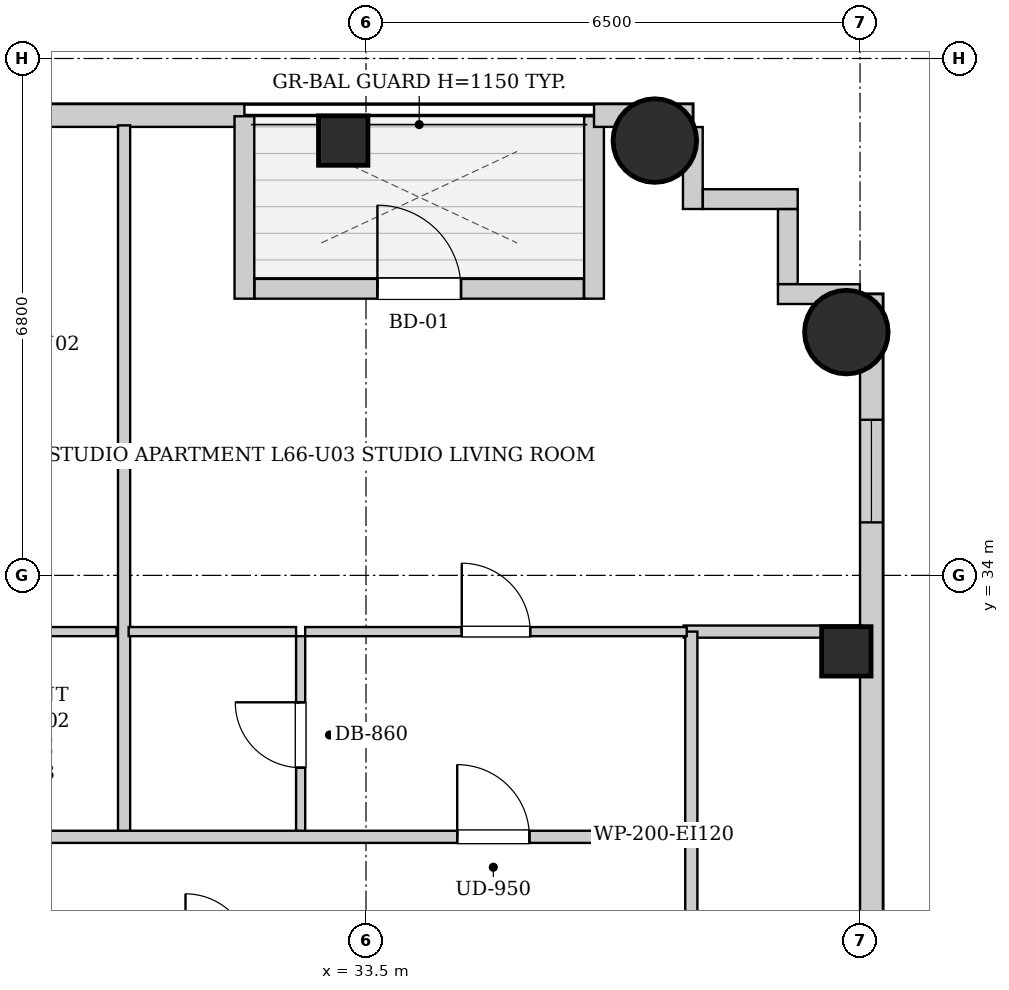
"""IFC4 building model, lengths in metres.
Left out: names, types, materials, properties, quantities, classifications, styles, units other than length and angle.
Written with IfcOpenShell. Run it as: python <this file> out.ifc"""

import sys

from ifc_helpers import new_model, si_unit, direction, frame, frame_2d, origin, origin_2d, place, context, subcontext, project, spatial, rectangle, circle, extrude, element, fill, save


model = new_model("IFC4")
c1 = context("Model", 3, precision=1e-05, world=origin(), true_north=direction((0.0, 1.0)))
c2 = subcontext(c1, "Body", "Model", "MODEL_VIEW")
j1 = project(units=[si_unit("LENGTHUNIT", "METRE"), si_unit("PLANEANGLEUNIT", "RADIAN")], contexts=[c1])
p1 = place(None, origin())
s1 = spatial("IfcSite", under=j1, at=p1, CompositionType="ELEMENT")
p2 = place(p1, origin())
s2 = spatial("IfcBuilding", under=s1, at=p2, CompositionType="ELEMENT")
p3 = place(p2, frame((0.0, 0.0, 227.5)))
s3 = spatial("IfcBuildingStorey", under=s2, at=p3, CompositionType="ELEMENT", Elevation=227.5)
p4 = place(p3, frame((33.2, 39.72, 0.0), z_axis=(0.0, 0.0, 1.0), x_axis=(1.0, 0.0, 0.0)))
e1 = element("IfcColumn", 1, at=p4, inside=s3, PredefinedType="COLUMN", context=c2, shape_type="SweptSolid", body=[
    extrude(rectangle(XDim=0.65, YDim=0.65, at=origin_2d()), origin(), (0.0, 0.0, 1.0), 3.4),
])
p5 = place(p3, frame((37.3, 39.72, 0.0), z_axis=(0.0, 0.0, 1.0), x_axis=(1.0, 0.0, 0.0)))
e2 = element("IfcColumn", 2, at=p5, inside=s3, PredefinedType="COLUMN", context=c2, shape_type="SweptSolid", body=[
    extrude(circle(Radius=0.55, at=origin_2d()), origin(), (0.0, 0.0, 1.0), 3.4),
])
p6 = place(p3, frame((39.82, 33.0, 0.0), z_axis=(0.0, 0.0, 1.0), x_axis=(1.0, 0.0, 0.0)))
e3 = element("IfcColumn", 3, at=p6, inside=s3, PredefinedType="COLUMN", context=c2, shape_type="SweptSolid", body=[
    extrude(rectangle(XDim=0.65, YDim=0.65, at=origin_2d()), origin(), (0.0, 0.0, 1.0), 3.4),
])
p7 = place(p3, frame((39.82, 37.2, 0.0), z_axis=(0.0, 0.0, 1.0), x_axis=(1.0, 0.0, 0.0)))
e4 = element("IfcColumn", 4, at=p7, inside=s3, PredefinedType="COLUMN", context=c2, shape_type="SweptSolid", body=[
    extrude(circle(Radius=0.55, at=origin_2d()), origin(), (0.0, 0.0, 1.0), 3.4),
])
p8 = place(p3, frame((13.1, 40.05, 0.0), z_axis=(0.0, 0.0, 1.0), x_axis=(1.0, 0.0, 0.0)))
e5 = element("IfcWall", 5, at=p8, inside=s3, PredefinedType="SOLIDWALL", context=c2, shape_type="SweptSolid", body=[
    extrude(rectangle(XDim=18.8, YDim=0.3, at=frame_2d((9.4, 0.0))), origin(), (0.0, 0.0, 1.0), 3.14),
])
p9 = place(p8, frame((1.806, 0.0, 0.55)))
e6 = element("IfcOpeningElement", 6, at=p9, cuts=e5, PredefinedType="OPENING", context=c2, shape_type="SweptSolid", body=[
    extrude(rectangle(XDim=1.35, YDim=1.2, at=frame_2d((0.675, 0.6))), frame((0.0, 0.16, 0.0), z_axis=(0.0, -1.0, 0.0), x_axis=(1.0, 0.0, 0.0)), (0.0, 0.0, 1.0), 0.32),
])
p10 = place(p8, frame((5.641, 0.0, 0.55)))
e7 = element("IfcOpeningElement", 7, at=p10, cuts=e5, PredefinedType="OPENING", context=c2, shape_type="SweptSolid", body=[
    extrude(rectangle(XDim=1.35, YDim=1.2, at=frame_2d((0.675, 0.6))), frame((0.0, 0.16, 0.0), z_axis=(0.0, -1.0, 0.0), x_axis=(1.0, 0.0, 0.0)), (0.0, 0.0, 1.0), 0.32),
])
p11 = place(p8, frame((8.55, 0.0, 0.55)))
e8 = element("IfcOpeningElement", 8, at=p11, cuts=e5, PredefinedType="OPENING", context=c2, shape_type="SweptSolid", body=[
    extrude(rectangle(XDim=0.85, YDim=1.2, at=frame_2d((0.425, 0.6))), frame((0.0, 0.16, 0.0), z_axis=(0.0, -1.0, 0.0), x_axis=(1.0, 0.0, 0.0)), (0.0, 0.0, 1.0), 0.32),
])
p12 = place(p8, frame((14.4, 0.0, 0.55)))
e9 = element("IfcOpeningElement", 9, at=p12, cuts=e5, PredefinedType="OPENING", context=c2, shape_type="SweptSolid", body=[
    extrude(rectangle(XDim=1.35, YDim=1.2, at=frame_2d((0.675, 0.6))), frame((0.0, 0.16, 0.0), z_axis=(0.0, -1.0, 0.0), x_axis=(1.0, 0.0, 0.0)), (0.0, 0.0, 1.0), 0.32),
])
p13 = place(p3, frame((31.9, 40.04, 0.0), z_axis=(0.0, 0.0, 1.0), x_axis=(0.0, -1.0, 0.0)))
e10 = element("IfcWall", 10, at=p13, inside=s3, PredefinedType="SOLIDWALL", context=c2, shape_type="SweptSolid", body=[
    extrude(rectangle(XDim=2.4, YDim=0.26, at=frame_2d((1.2, 0.0))), origin(), (0.0, 0.0, 1.0), 3.14),
])
p14 = place(p3, frame((32.034, 37.77, 0.0), z_axis=(0.0, 0.0, 1.0), x_axis=(1.0, 0.0, 0.0)))
e11 = element("IfcWall", 11, at=p14, inside=s3, PredefinedType="SOLIDWALL", context=c2, shape_type="SweptSolid", body=[
    extrude(rectangle(XDim=4.332, YDim=0.26, at=frame_2d((2.166, 0.0))), origin(), (0.0, 0.0, 1.0), 3.14),
])
p15 = place(p14, frame((1.616, 0.0, 0.0)))
e12 = element("IfcOpeningElement", 12, at=p15, cuts=e11, PredefinedType="OPENING", context=c2, shape_type="SweptSolid", body=[
    extrude(rectangle(XDim=1.1, YDim=2.0, at=frame_2d((0.55, 1.0))), frame((0.0, 0.14, 0.0), z_axis=(0.0, -1.0, 0.0), x_axis=(1.0, 0.0, 0.0)), (0.0, 0.0, 1.0), 0.28),
])
p16 = place(p3, frame((36.5, 37.64, 0.0), z_axis=(0.0, 0.0, 1.0), x_axis=(0.0, 1.0, 0.0)))
e13 = element("IfcWall", 13, at=p16, inside=s3, PredefinedType="SOLIDWALL", context=c2, shape_type="SweptSolid", body=[
    extrude(rectangle(XDim=2.4, YDim=0.26, at=frame_2d((1.2, 0.0))), origin(), (0.0, 0.0, 1.0), 3.14),
])
p17 = place(p3, frame((36.5, 40.05, 0.0), z_axis=(0.0, 0.0, 1.0), x_axis=(1.0, 0.0, 0.0)))
e14 = element("IfcWall", 14, at=p17, inside=s3, PredefinedType="SOLIDWALL", context=c2, shape_type="SweptSolid", body=[
    extrude(rectangle(XDim=1.3, YDim=0.3, at=frame_2d((0.65, 0.0))), origin(), (0.0, 0.0, 1.0), 3.14),
])
p18 = place(p3, frame((40.15, 37.7, 0.0), z_axis=(0.0, 0.0, 1.0), x_axis=(0.0, -1.0, 0.0)))
e15 = element("IfcWall", 15, at=p18, inside=s3, PredefinedType="SOLIDWALL", context=c2, shape_type="SweptSolid", body=[
    extrude(rectangle(XDim=31.4, YDim=0.3, at=frame_2d((15.7, 0.0))), origin(), (0.0, 0.0, 1.0), 3.14),
])
p19 = place(p18, frame((28.396, 0.0, 0.55)))
e16 = element("IfcOpeningElement", 16, at=p19, cuts=e15, PredefinedType="OPENING", context=c2, shape_type="SweptSolid", body=[
    extrude(rectangle(XDim=1.35, YDim=1.2, at=frame_2d((0.675, 0.6))), frame((0.0, 0.16, 0.0), z_axis=(0.0, -1.0, 0.0), x_axis=(1.0, 0.0, 0.0)), (0.0, 0.0, 1.0), 0.32),
])
p20 = place(p18, frame((1.653, 0.0, 0.55)))
e17 = element("IfcOpeningElement", 17, at=p20, cuts=e15, PredefinedType="OPENING", context=c2, shape_type="SweptSolid", body=[
    extrude(rectangle(XDim=1.35, YDim=1.2, at=frame_2d((0.675, 0.6))), frame((0.0, 0.16, 0.0), z_axis=(0.0, -1.0, 0.0), x_axis=(1.0, 0.0, 0.0)), (0.0, 0.0, 1.0), 0.32),
])
p21 = place(p18, frame((19.683, 0.0, 0.55)))
e18 = element("IfcOpeningElement", 18, at=p21, cuts=e15, PredefinedType="OPENING", context=c2, shape_type="SweptSolid", body=[
    extrude(rectangle(XDim=1.35, YDim=1.2, at=frame_2d((0.675, 0.6))), frame((0.0, 0.16, 0.0), z_axis=(0.0, -1.0, 0.0), x_axis=(1.0, 0.0, 0.0)), (0.0, 0.0, 1.0), 0.32),
])
p22 = place(p18, frame((10.367, 0.0, 0.55)))
e19 = element("IfcOpeningElement", 19, at=p22, cuts=e15, PredefinedType="OPENING", context=c2, shape_type="SweptSolid", body=[
    extrude(rectangle(XDim=1.35, YDim=1.2, at=frame_2d((0.675, 0.6))), frame((0.0, 0.16, 0.0), z_axis=(0.0, -1.0, 0.0), x_axis=(1.0, 0.0, 0.0)), (0.0, 0.0, 1.0), 0.32),
])
p23 = place(p3, frame((37.8, 39.898, 0.0), z_axis=(0.0, 0.0, 1.0), x_axis=(0.0, -1.0, 0.0)))
e20 = element("IfcWall", 20, at=p23, inside=s3, PredefinedType="SOLIDWALL", context=c2, shape_type="SweptSolid", body=[
    extrude(rectangle(XDim=1.078, YDim=0.26, at=frame_2d((0.539, 0.0))), origin(), (0.0, 0.0, 1.0), 3.14),
])
p24 = place(p3, frame((37.932, 38.95, 0.0), z_axis=(0.0, 0.0, 1.0), x_axis=(1.0, 0.0, 0.0)))
e21 = element("IfcWall", 21, at=p24, inside=s3, PredefinedType="SOLIDWALL", context=c2, shape_type="SweptSolid", body=[
    extrude(rectangle(XDim=1.248, YDim=0.26, at=frame_2d((0.624, 0.0))), origin(), (0.0, 0.0, 1.0), 3.14),
])
p25 = place(p3, frame((39.05, 38.818, 0.0), z_axis=(0.0, 0.0, 1.0), x_axis=(0.0, -1.0, 0.0)))
e22 = element("IfcWall", 22, at=p25, inside=s3, PredefinedType="SOLIDWALL", context=c2, shape_type="SweptSolid", body=[
    extrude(rectangle(XDim=0.986, YDim=0.26, at=frame_2d((0.493, 0.0))), origin(), (0.0, 0.0, 1.0), 3.14),
])
p26 = place(p3, frame((38.92, 37.7, 0.0), z_axis=(0.0, 0.0, 1.0), x_axis=(1.0, 0.0, 0.0)))
e23 = element("IfcWall", 23, at=p26, inside=s3, PredefinedType="SOLIDWALL", context=c2, shape_type="SweptSolid", body=[
    extrude(rectangle(XDim=1.078, YDim=0.26, at=frame_2d((0.539, 0.0))), origin(), (0.0, 0.0, 1.0), 3.14),
])
p27 = place(p3, frame((37.78, 28.98, 0.0), z_axis=(0.0, 0.0, 1.0), x_axis=(0.0, 1.0, 0.0)))
e24 = element("IfcWall", 24, at=p27, inside=s3, PredefinedType="PARTITIONING", context=c2, shape_type="SweptSolid", body=[
    extrude(rectangle(XDim=1.58, YDim=0.16, at=frame_2d((0.79, 0.0))), origin(), (0.0, 0.0, 1.0), 3.14),
])
p28 = place(p3, frame((27.25, 33.26, 0.0), z_axis=(0.0, 0.0, 1.0), x_axis=(1.0, 0.0, 0.0)))
e25 = element("IfcWall", 25, at=p28, inside=s3, PredefinedType="PARTITIONING", context=c2, shape_type="SweptSolid", body=[
    extrude(rectangle(XDim=2.967, YDim=0.12, at=frame_2d((1.483, 0.0))), origin(), (0.0, 0.0, 1.0), 3.14),
])
p29 = place(p28, frame((1.033, 0.0, 0.0)))
e26 = element("IfcOpeningElement", 26, at=p29, cuts=e25, PredefinedType="OPENING", context=c2, shape_type="SweptSolid", body=[
    extrude(rectangle(XDim=0.9, YDim=2.05, at=frame_2d((0.45, 1.025))), frame((0.0, 0.07, 0.0), z_axis=(0.0, -1.0, 0.0), x_axis=(1.0, 0.0, 0.0)), (0.0, 0.0, 1.0), 0.14),
])
p30 = place(p3, frame((37.68, 33.26, 0.0), z_axis=(0.0, 0.0, 1.0), x_axis=(1.0, 0.0, 0.0)))
e27 = element("IfcWall", 27, at=p30, inside=s3, PredefinedType="PARTITIONING", context=c2, shape_type="SweptSolid", body=[
    extrude(rectangle(XDim=2.34, YDim=0.16, at=frame_2d((1.17, 0.0))), origin(), (0.0, 0.0, 1.0), 3.14),
])
p31 = place(p3, frame((37.78, 30.6, 0.0), z_axis=(0.0, 0.0, 1.0), x_axis=(0.0, 1.0, 0.0)))
e28 = element("IfcWall", 28, at=p31, inside=s3, PredefinedType="PARTITIONING", context=c2, shape_type="SweptSolid", body=[
    extrude(rectangle(XDim=2.66, YDim=0.16, at=frame_2d((1.33, 0.0))), origin(), (0.0, 0.0, 1.0), 3.14),
])
p32 = place(p3, frame((30.317, 30.6, 0.0), z_axis=(0.0, 0.0, 1.0), x_axis=(0.0, 1.0, 0.0)))
e29 = element("IfcWall", 29, at=p32, inside=s3, PredefinedType="PARTITIONING", context=c2, shape_type="SweptSolid", body=[
    extrude(rectangle(XDim=9.32, YDim=0.16, at=frame_2d((4.66, 0.0))), origin(), (0.0, 0.0, 1.0), 3.14),
])
p33 = place(p3, frame((32.64, 30.6, 0.0), z_axis=(0.0, 0.0, 1.0), x_axis=(0.0, 1.0, 0.0)))
e30 = element("IfcWall", 30, at=p33, inside=s3, PredefinedType="PARTITIONING", context=c2, shape_type="SweptSolid", body=[
    extrude(rectangle(XDim=2.6, YDim=0.12, at=frame_2d((1.3, 0.0))), origin(), (0.0, 0.0, 1.0), 3.14),
])
p34 = place(p33, frame((0.87, 0.0, 0.0)))
e31 = element("IfcOpeningElement", 31, at=p34, cuts=e30, PredefinedType="OPENING", context=c2, shape_type="SweptSolid", body=[
    extrude(rectangle(XDim=0.86, YDim=2.05, at=frame_2d((0.43, 1.025))), frame((0.0, 0.07, 0.0), z_axis=(0.0, -1.0, 0.0), x_axis=(1.0, 0.0, 0.0)), (0.0, 0.0, 1.0), 0.14),
])
p35 = place(p3, frame((30.377, 33.26, 0.0), z_axis=(0.0, 0.0, 1.0), x_axis=(1.0, 0.0, 0.0)))
e32 = element("IfcWall", 32, at=p35, inside=s3, PredefinedType="PARTITIONING", context=c2, shape_type="SweptSolid", body=[
    extrude(rectangle(XDim=2.203, YDim=0.12, at=frame_2d((1.102, 0.0))), origin(), (0.0, 0.0, 1.0), 3.14),
])
p36 = place(p3, frame((32.7, 33.26, 0.0), z_axis=(0.0, 0.0, 1.0), x_axis=(1.0, 0.0, 0.0)))
e33 = element("IfcWall", 33, at=p36, inside=s3, PredefinedType="PARTITIONING", context=c2, shape_type="SweptSolid", body=[
    extrude(rectangle(XDim=5.02, YDim=0.12, at=frame_2d((2.51, 0.0))), origin(), (0.0, 0.0, 1.0), 3.14),
])
p37 = place(p36, frame((2.06, 0.0, 0.0)))
e34 = element("IfcOpeningElement", 34, at=p37, cuts=e33, PredefinedType="OPENING", context=c2, shape_type="SweptSolid", body=[
    extrude(rectangle(XDim=0.9, YDim=2.05, at=frame_2d((0.45, 1.025))), frame((0.0, 0.07, 0.0), z_axis=(0.0, -1.0, 0.0), x_axis=(1.0, 0.0, 0.0)), (0.0, 0.0, 1.0), 0.14),
])
p38 = place(p3, frame((13.15, 30.56, 0.0), z_axis=(0.0, 0.0, 1.0), x_axis=(1.0, 0.0, 0.0)))
e35 = element("IfcWall", 35, at=p38, inside=s3, PredefinedType="PARTITIONING", context=c2, shape_type="SweptSolid", body=[
    extrude(rectangle(XDim=24.6, YDim=0.16, at=frame_2d((12.3, 0.0))), origin(), (0.0, 0.0, 1.0), 3.14),
])
p39 = place(p38, frame((5.185, 0.0, 0.0)))
e36 = element("IfcOpeningElement", 36, at=p39, cuts=e35, PredefinedType="OPENING", context=c2, shape_type="SweptSolid", body=[
    extrude(rectangle(XDim=0.95, YDim=2.1, at=frame_2d((0.475, 1.05))), frame((0.0, 0.09, 0.0), z_axis=(0.0, -1.0, 0.0), x_axis=(1.0, 0.0, 0.0)), (0.0, 0.0, 1.0), 0.18),
])
p40 = place(p38, frame((21.55, 0.0, 0.0)))
e37 = element("IfcOpeningElement", 37, at=p40, cuts=e35, PredefinedType="OPENING", context=c2, shape_type="SweptSolid", body=[
    extrude(rectangle(XDim=0.95, YDim=2.1, at=frame_2d((0.475, 1.05))), frame((0.0, 0.09, 0.0), z_axis=(0.0, -1.0, 0.0), x_axis=(1.0, 0.0, 0.0)), (0.0, 0.0, 1.0), 0.18),
])
p41 = place(p34, origin())
e38 = element("IfcDoor", 38, at=p41, inside=s3, OperationType="SINGLE_SWING_RIGHT", PredefinedType="DOOR", context=c2, shape_type="SweptSolid", body=[
    extrude(rectangle(XDim=0.86, YDim=2.05, at=frame_2d((0.43, 1.025))), frame((0.0, 0.025, 0.0), z_axis=(0.0, -1.0, 0.0), x_axis=(1.0, 0.0, 0.0)), (0.0, 0.0, 1.0), 0.05),
])
fill(e31, e38)
p42 = place(p37, origin())
e39 = element("IfcDoor", 39, at=p42, inside=s3, OperationType="SINGLE_SWING_LEFT", PredefinedType="DOOR", context=c2, shape_type="SweptSolid", body=[
    extrude(rectangle(XDim=0.9, YDim=2.05, at=frame_2d((0.45, 1.025))), frame((0.0, 0.025, 0.0), z_axis=(0.0, -1.0, 0.0), x_axis=(1.0, 0.0, 0.0)), (0.0, 0.0, 1.0), 0.05),
])
fill(e34, e39)
p43 = place(p40, origin())
e40 = element("IfcDoor", 40, at=p43, inside=s3, OperationType="SINGLE_SWING_LEFT", PredefinedType="DOOR", context=c2, shape_type="SweptSolid", body=[
    extrude(rectangle(XDim=0.95, YDim=2.1, at=frame_2d((0.475, 1.05))), frame((0.0, 0.025, 0.0), z_axis=(0.0, -1.0, 0.0), x_axis=(1.0, 0.0, 0.0)), (0.0, 0.0, 1.0), 0.05),
])
fill(e37, e40)
p44 = place(p15, origin())
e41 = element("IfcDoor", 41, at=p44, inside=s3, OperationType="SINGLE_SWING_LEFT", PredefinedType="DOOR", context=c2, shape_type="SweptSolid", body=[
    extrude(rectangle(XDim=1.1, YDim=2.0, at=frame_2d((0.55, 1.0))), frame((0.0, 0.025, 0.0), z_axis=(0.0, -1.0, 0.0), x_axis=(1.0, 0.0, 0.0)), (0.0, 0.0, 1.0), 0.05),
])
fill(e12, e41)
p45 = place(p20, origin())
e42 = element("IfcWindow", 42, at=p45, inside=s3, PartitioningType="SINGLE_PANEL", PredefinedType="WINDOW", context=c2, shape_type="SweptSolid", body=[
    extrude(rectangle(XDim=1.35, YDim=1.2, at=frame_2d((0.675, 0.6))), frame((0.0, 0.03, 0.0), z_axis=(0.0, -1.0, 0.0), x_axis=(1.0, 0.0, 0.0)), (0.0, 0.0, 1.0), 0.06),
])
fill(e17, e42)
save(model, sys.argv[1])
